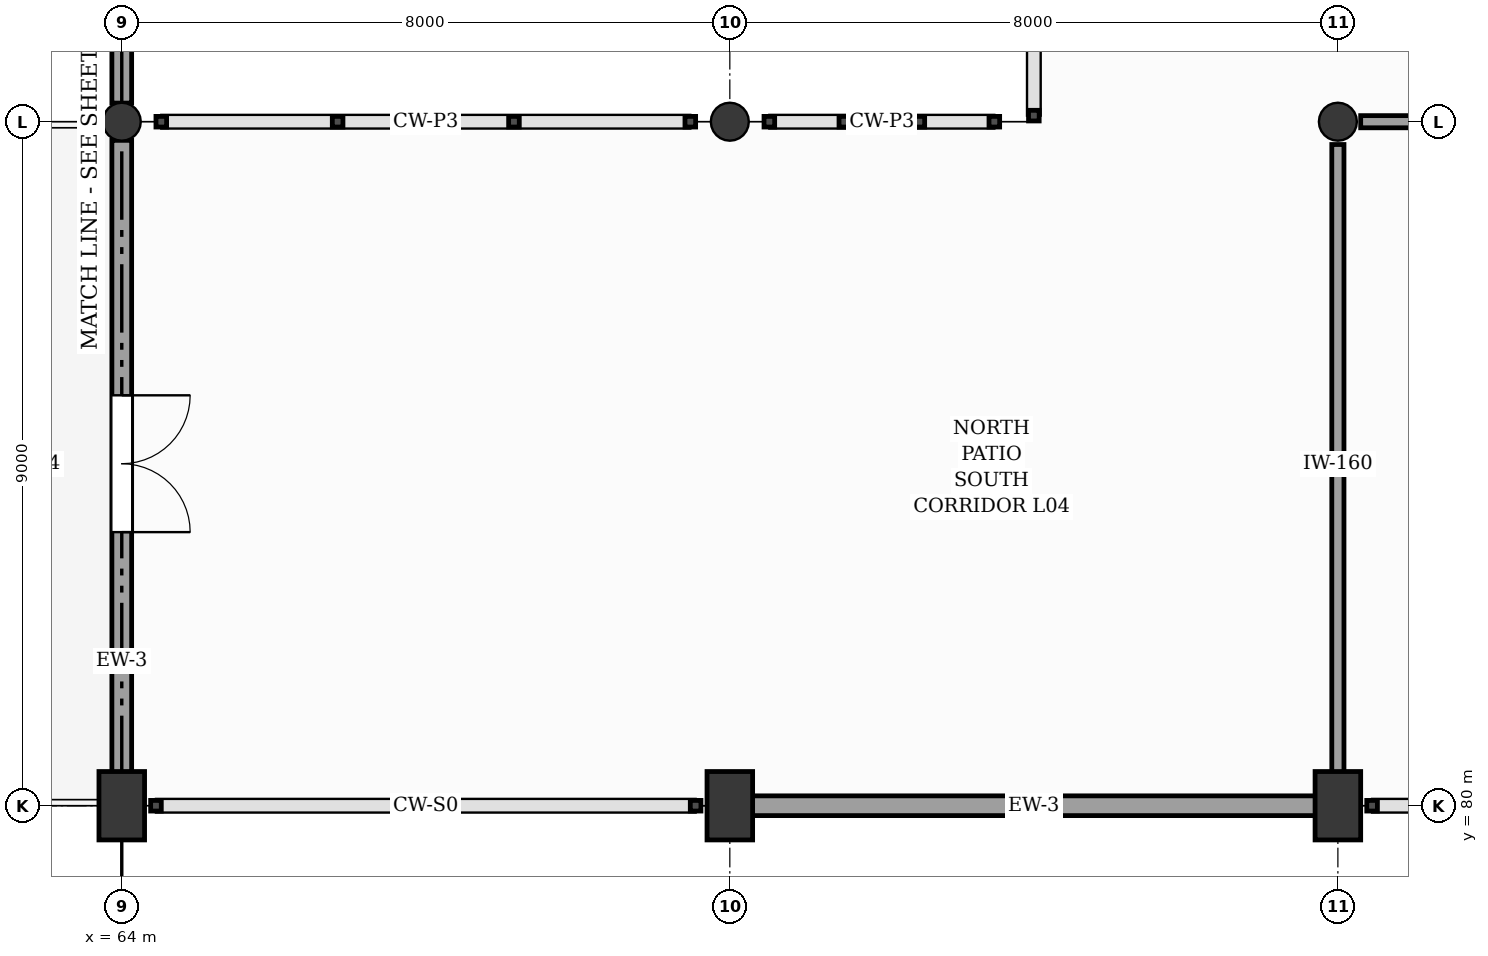
"""IFC4 building model, lengths in metres.
Left out: names, types, materials, properties, quantities, classifications, styles, units other than length and angle.
Written with IfcOpenShell. Run it as: python <this file> out.ifc"""

import sys

from ifc_helpers import new_model, si_unit, direction, frame, frame_2d, origin, origin_2d, place, context, subcontext, project, spatial, rectangle, circle, extrude, element, fill, save


model = new_model("IFC4")
c1 = context("Model", 3, precision=1e-05, world=origin(), true_north=direction((0.0, 1.0)))
c2 = subcontext(c1, "Body", "Model", "MODEL_VIEW")
j1 = project(units=[si_unit("LENGTHUNIT", "METRE"), si_unit("PLANEANGLEUNIT", "RADIAN")], contexts=[c1])
p1 = place(None, origin())
s1 = spatial("IfcSite", under=j1, at=p1, CompositionType="ELEMENT")
p2 = place(p1, origin())
s2 = spatial("IfcBuilding", under=s1, at=p2, CompositionType="ELEMENT")
p3 = place(p2, frame((0.0, 0.0, 20.4)))
s3 = spatial("IfcBuildingStorey", under=s2, at=p3, CompositionType="ELEMENT", Elevation=20.4)
p4 = place(p3, frame((64.0, 80.0, 0.0), z_axis=(0.0, 0.0, 1.0), x_axis=(1.0, 0.0, 0.0)))
e1 = element("IfcColumn", 1, at=p4, inside=s3, PredefinedType="COLUMN", context=c2, shape_type="SweptSolid", body=[
    extrude(rectangle(XDim=0.6, YDim=0.9, at=origin_2d()), origin(), (0.0, 0.0, 1.0), 4.2),
])
p5 = place(p3, frame((64.0, 89.0, 0.0), z_axis=(0.0, 0.0, 1.0), x_axis=(1.0, 0.0, 0.0)))
e2 = element("IfcColumn", 2, at=p5, inside=s3, PredefinedType="COLUMN", context=c2, shape_type="SweptSolid", body=[
    extrude(circle(Radius=0.25, at=origin_2d()), origin(), (0.0, 0.0, 1.0), 4.2),
])
p6 = place(p3, frame((72.0, 80.0, 0.0), z_axis=(0.0, 0.0, 1.0), x_axis=(1.0, 0.0, 0.0)))
e3 = element("IfcColumn", 3, at=p6, inside=s3, PredefinedType="COLUMN", context=c2, shape_type="SweptSolid", body=[
    extrude(rectangle(XDim=0.6, YDim=0.9, at=origin_2d()), origin(), (0.0, 0.0, 1.0), 4.2),
])
p7 = place(p3, frame((72.0, 89.0, 0.0), z_axis=(0.0, 0.0, 1.0), x_axis=(1.0, 0.0, 0.0)))
e4 = element("IfcColumn", 4, at=p7, inside=s3, PredefinedType="COLUMN", context=c2, shape_type="SweptSolid", body=[
    extrude(circle(Radius=0.25, at=origin_2d()), origin(), (0.0, 0.0, 1.0), 4.2),
])
p8 = place(p3, frame((80.0, 80.0, 0.0), z_axis=(0.0, 0.0, 1.0), x_axis=(1.0, 0.0, 0.0)))
e5 = element("IfcColumn", 5, at=p8, inside=s3, PredefinedType="COLUMN", context=c2, shape_type="SweptSolid", body=[
    extrude(rectangle(XDim=0.6, YDim=0.9, at=origin_2d()), origin(), (0.0, 0.0, 1.0), 4.2),
])
p9 = place(p3, frame((80.0, 89.0, 0.0), z_axis=(0.0, 0.0, 1.0), x_axis=(1.0, 0.0, 0.0)))
e6 = element("IfcColumn", 6, at=p9, inside=s3, PredefinedType="COLUMN", context=c2, shape_type="SweptSolid", body=[
    extrude(circle(Radius=0.25, at=origin_2d()), origin(), (0.0, 0.0, 1.0), 4.2),
])
p10 = place(p3, frame((72.295, 80.0, 0.0), z_axis=(0.0, 0.0, 1.0), x_axis=(1.0, 0.0, 0.0)))
e7 = element("IfcWall", 7, at=p10, inside=s3, PredefinedType="SOLIDWALL", context=c2, shape_type="SweptSolid", body=[
    extrude(rectangle(XDim=7.41, YDim=0.26, at=frame_2d((3.705, 0.0))), origin(), (0.0, 0.0, 1.0), 2.96),
])
p11 = place(p3, frame((64.0, 80.4, 0.0), z_axis=(0.0, 0.0, 1.0), x_axis=(0.0, 1.0, 0.0)))
e8 = element("IfcWall", 8, at=p11, inside=s3, PredefinedType="SOLIDWALL", context=c2, shape_type="SweptSolid", body=[
    extrude(rectangle(XDim=8.355, YDim=0.26, at=frame_2d((4.177, 0.0))), origin(), (0.0, 0.0, 1.0), 2.96),
])
p12 = place(p11, frame((3.2, 0.0, 0.0)))
e9 = element("IfcOpeningElement", 9, at=p12, cuts=e8, PredefinedType="OPENING", context=c2, shape_type="SweptSolid", body=[
    extrude(rectangle(XDim=1.8, YDim=2.2, at=frame_2d((0.9, 1.1))), frame((0.0, 0.14, 0.0), z_axis=(0.0, -1.0, 0.0), x_axis=(1.0, 0.0, 0.0)), (0.0, 0.0, 1.0), 0.28),
])
p13 = place(p3, frame((64.0, 89.245, 0.0), z_axis=(0.0, 0.0, 1.0), x_axis=(0.0, 1.0, 0.0)))
e10 = element("IfcWall", 10, at=p13, inside=s3, PredefinedType="SOLIDWALL", context=c2, shape_type="SweptSolid", body=[
    extrude(rectangle(XDim=8.355, YDim=0.26, at=frame_2d((4.177, 0.0))), origin(), (0.0, 0.0, 1.0), 3.21),
])
p14 = place(p13, frame((3.455, 0.0, 0.95)))
e11 = element("IfcOpeningElement", 11, at=p14, cuts=e10, PredefinedType="OPENING", context=c2, shape_type="SweptSolid", body=[
    extrude(rectangle(XDim=1.6, YDim=2.1, at=frame_2d((0.8, 1.05))), frame((0.0, 0.14, 0.0), z_axis=(0.0, -1.0, 0.0), x_axis=(1.0, 0.0, 0.0)), (0.0, 0.0, 1.0), 0.28),
])
p15 = place(p3, frame((80.3, 89.0, 0.0), z_axis=(0.0, 0.0, 1.0), x_axis=(1.0, 0.0, 0.0)))
e12 = element("IfcWall", 12, at=p15, inside=s3, PredefinedType="PARTITIONING", context=c2, shape_type="SweptSolid", body=[
    extrude(rectangle(XDim=7.4, YDim=0.16, at=frame_2d((3.7, 0.0))), origin(), (0.0, 0.0, 1.0), 3.1),
])
p16 = place(p15, frame((2.8, 0.0, 0.0)))
e13 = element("IfcOpeningElement", 13, at=p16, cuts=e12, PredefinedType="OPENING", context=c2, shape_type="SweptSolid", body=[
    extrude(rectangle(XDim=1.8, YDim=2.25, at=frame_2d((0.9, 1.125))), frame((0.0, 0.09, 0.0), z_axis=(0.0, -1.0, 0.0), x_axis=(1.0, 0.0, 0.0)), (0.0, 0.0, 1.0), 0.18),
])
p17 = place(p3, frame((80.0, 80.3, 0.0), z_axis=(0.0, 0.0, 1.0), x_axis=(0.0, 1.0, 0.0)))
e14 = element("IfcWall", 14, at=p17, inside=s3, PredefinedType="PARTITIONING", context=c2, shape_type="SweptSolid", body=[
    extrude(rectangle(XDim=8.4, YDim=0.16, at=frame_2d((4.2, 0.0))), origin(), (0.0, 0.0, 1.0), 2.96),
])
p18 = place(p12, frame((1.8, 0.0, 0.0), z_axis=(0.0, 0.0, 1.0), x_axis=(-1.0, 0.0, 0.0)))
e15 = element("IfcDoor", 15, at=p18, inside=s3, OperationType="DOUBLE_DOOR_SINGLE_SWING", PredefinedType="DOOR", context=c2, shape_type="SweptSolid", body=[
    extrude(rectangle(XDim=1.8, YDim=2.2, at=frame_2d((0.9, 1.1))), frame((0.0, 0.025, 0.0), z_axis=(0.0, -1.0, 0.0), x_axis=(1.0, 0.0, 0.0)), (0.0, 0.0, 1.0), 0.05),
])
fill(e9, e15)
save(model, sys.argv[1])
